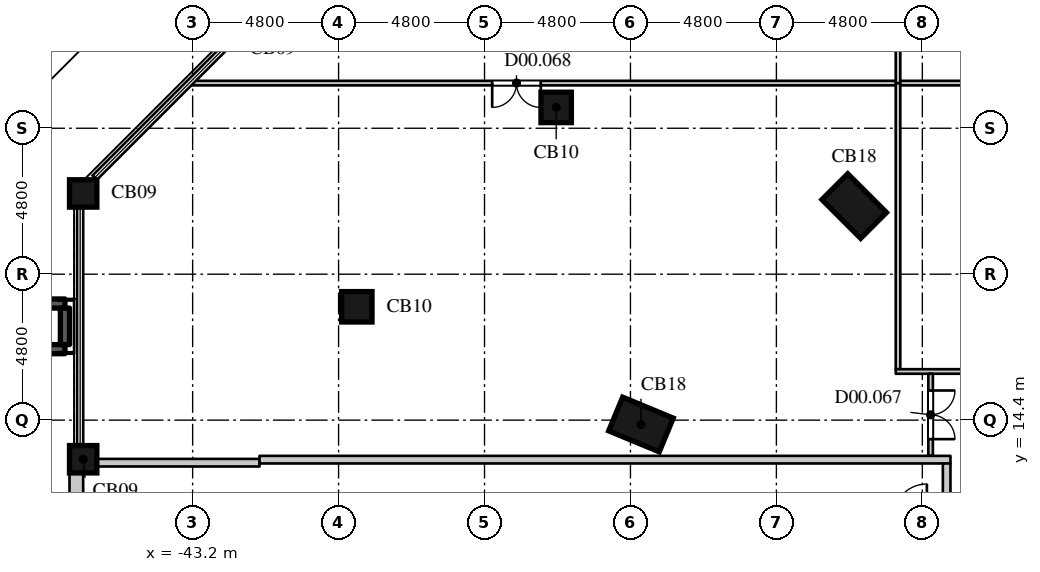
"""IFC4 building model, lengths in metres.
Left out: names, types, materials, properties, quantities, classifications, styles, units other than length and angle.
Written with IfcOpenShell. Run it as: python <this file> out.ifc"""

import sys

from ifc_helpers import new_model, si_unit, direction, frame, frame_2d, origin, origin_2d, place, context, subcontext, project, spatial, rectangle, extrude, element, fill, save


model = new_model("IFC4")
c1 = context("Model", 3, precision=1e-05, world=origin(), true_north=direction((0.0, 1.0)))
c2 = subcontext(c1, "Body", "Model", "MODEL_VIEW")
j1 = project(units=[si_unit("LENGTHUNIT", "METRE"), si_unit("PLANEANGLEUNIT", "RADIAN")], contexts=[c1])
p1 = place(None, origin())
s1 = spatial("IfcSite", under=j1, at=p1, CompositionType="ELEMENT")
p2 = place(p1, origin())
s2 = spatial("IfcBuilding", under=s1, at=p2, CompositionType="ELEMENT")
p3 = place(p2, origin())
s3 = spatial("IfcBuildingStorey", under=s2, at=p3, CompositionType="ELEMENT", Elevation=0.0)
p4 = place(p3, frame((-46.8, 13.114, 0.0), z_axis=(0.0, 0.0, 1.0), x_axis=(1.0, 0.0, 0.0)))
e1 = element("IfcColumn", 1, at=p4, inside=s3, PredefinedType="COLUMN", context=c2, shape_type="SweptSolid", body=[
    extrude(rectangle(XDim=0.9, YDim=0.9, at=origin_2d()), origin(), (0.0, 0.0, 1.0), 6.0),
])
p5 = place(p3, frame((-28.454, 14.257, 0.0), z_axis=(0.0, 0.0, 1.0), x_axis=(-0.382683496864, -0.923879505795, 0.0)))
e2 = element("IfcColumn", 2, at=p5, inside=s3, PredefinedType="COLUMN", context=c2, shape_type="SweptSolid", body=[
    extrude(rectangle(XDim=1.2, YDim=1.8, at=origin_2d()), origin(), (0.0, 0.0, 1.0), 6.0),
])
p6 = place(p3, frame((-37.8, 18.128, 0.0), z_axis=(0.0, 0.0, 1.0), x_axis=(1.0, 0.0, 0.0)))
e3 = element("IfcColumn", 3, at=p6, inside=s3, PredefinedType="COLUMN", context=c2, shape_type="SweptSolid", body=[
    extrude(rectangle(XDim=1.0, YDim=1.0, at=origin_2d()), origin(), (0.0, 0.0, 1.0), 6.0),
])
p7 = place(p3, frame((-21.441, 21.441, 0.0), z_axis=(0.0, 0.0, 1.0), x_axis=(-0.707106781187, -0.707106781187, 0.0)))
e4 = element("IfcColumn", 4, at=p7, inside=s3, PredefinedType="COLUMN", context=c2, shape_type="SweptSolid", body=[
    extrude(rectangle(XDim=1.2, YDim=1.8, at=origin_2d()), origin(), (0.0, 0.0, 1.0), 6.0),
])
p8 = place(p3, frame((-46.8, 21.856, 0.0), z_axis=(0.0, 0.0, 1.0), x_axis=(1.0, 0.0, 0.0)))
e5 = element("IfcColumn", 5, at=p8, inside=s3, PredefinedType="COLUMN", context=c2, shape_type="SweptSolid", body=[
    extrude(rectangle(XDim=0.9, YDim=0.9, at=origin_2d()), origin(), (0.0, 0.0, 1.0), 6.0),
])
p9 = place(p3, frame((-31.243, 24.685, 0.0), z_axis=(0.0, 0.0, 1.0), x_axis=(1.0, 0.0, 0.0)))
e6 = element("IfcColumn", 6, at=p9, inside=s3, PredefinedType="COLUMN", context=c2, shape_type="SweptSolid", body=[
    extrude(rectangle(XDim=1.0, YDim=1.0, at=origin_2d()), origin(), (0.0, 0.0, 1.0), 6.0),
])
p10 = place(p3, frame((-47.025, 12.664, 0.0), z_axis=(0.0, 0.0, 1.0), x_axis=(0.0, -1.0, 0.0)))
e7 = element("IfcWall", 7, at=p10, inside=s3, PredefinedType="ELEMENTEDWALL", context=c2, shape_type="SweptSolid", body=[
    extrude(rectangle(XDim=7.842, YDim=0.45, at=frame_2d((3.921, 0.0))), origin(), (0.0, 0.0, 1.0), 4.8),
])
p11 = place(p10, frame((1.01, 0.0, 0.0)))
e8 = element("IfcOpeningElement", 8, at=p11, cuts=e7, PredefinedType="OPENING", context=c2, shape_type="SweptSolid", body=[
    extrude(rectangle(XDim=1.9, YDim=2.7, at=frame_2d((0.95, 1.35))), frame((0.0, 0.235, 0.0), z_axis=(0.0, -1.0, 0.0), x_axis=(1.0, 0.0, 0.0)), (0.0, 0.0, 1.0), 0.47),
])
p12 = place(p10, frame((4.371, 0.0, 1.05)))
e9 = element("IfcOpeningElement", 9, at=p12, cuts=e7, PredefinedType="OPENING", context=c2, shape_type="SweptSolid", body=[
    extrude(rectangle(XDim=2.29, YDim=2.7, at=frame_2d((1.145, 1.35))), frame((0.0, 0.235, 0.0), z_axis=(0.0, -1.0, 0.0), x_axis=(1.0, 0.0, 0.0)), (0.0, 0.0, 1.0), 0.47),
])
p13 = place(p3, frame((-43.248, 25.485, 0.0), z_axis=(0.0, 0.0, 1.0), x_axis=(1.0, 0.0, 0.0)))
e10 = element("IfcWall", 10, at=p13, inside=s3, PredefinedType="PARTITIONING", context=c2, shape_type="SweptSolid", body=[
    extrude(rectangle(XDim=30.023, YDim=0.15, at=frame_2d((15.012, 0.0))), origin(), (0.0, 0.0, 1.0), 5.65),
])
p14 = place(p13, frame((9.9, 0.0, 0.0)))
e11 = element("IfcOpeningElement", 11, at=p14, cuts=e10, PredefinedType="OPENING", context=c2, shape_type="SweptSolid", body=[
    extrude(rectangle(XDim=1.6, YDim=2.4, at=frame_2d((0.8, 1.2))), frame((0.0, 0.085, 0.0), z_axis=(0.0, -1.0, 0.0), x_axis=(1.0, 0.0, 0.0)), (0.0, 0.0, 1.0), 0.17),
])
p15 = place(p3, frame((-20.0, 16.075, 0.0), z_axis=(0.0, 0.0, 1.0), x_axis=(0.0, 1.0, 0.0)))
e12 = element("IfcWall", 12, at=p15, inside=s3, PredefinedType="PARTITIONING", context=c2, shape_type="SweptSolid", body=[
    extrude(rectangle(XDim=9.41, YDim=0.15, at=frame_2d((4.705, 0.0))), origin(), (0.0, 0.0, 1.0), 5.65),
])
p16 = place(p3, frame((-20.075, 16.0, 0.0), z_axis=(0.0, 0.0, 1.0), x_axis=(1.0, 0.0, 0.0)))
e13 = element("IfcWall", 13, at=p16, inside=s3, PredefinedType="PARTITIONING", context=c2, shape_type="SweptSolid", body=[
    extrude(rectangle(XDim=8.95, YDim=0.15, at=frame_2d((4.475, 0.0))), origin(), (0.0, 0.0, 1.0), 5.65),
])
p17 = place(p16, frame((4.15, 0.0, 0.0)))
e14 = element("IfcOpeningElement", 14, at=p17, cuts=e13, PredefinedType="OPENING", context=c2, shape_type="SweptSolid", body=[
    extrude(rectangle(XDim=1.6, YDim=2.4, at=frame_2d((0.8, 1.2))), frame((0.0, 0.085, 0.0), z_axis=(0.0, -1.0, 0.0), x_axis=(1.0, 0.0, 0.0)), (0.0, 0.0, 1.0), 0.17),
])
p18 = place(p3, frame((-20.0, 25.485, 0.0), z_axis=(0.0, 0.0, 1.0), x_axis=(0.0, 1.0, 0.0)))
e15 = element("IfcWall", 15, at=p18, inside=s3, PredefinedType="PARTITIONING", context=c2, shape_type="SweptSolid", body=[
    extrude(rectangle(XDim=21.37, YDim=0.15, at=frame_2d((10.685, 0.0))), origin(), (0.0, 0.0, 1.0), 5.65),
])
p19 = place(p3, frame((-18.928, 13.225, 0.0), z_axis=(0.0, 0.0, 1.0), x_axis=(0.0, 1.0, 0.0)))
e16 = element("IfcWall", 16, at=p19, inside=s3, PredefinedType="PARTITIONING", context=c2, shape_type="SweptSolid", body=[
    extrude(rectangle(XDim=2.7, YDim=0.15, at=frame_2d((1.35, 0.0))), origin(), (0.0, 0.0, 1.0), 5.65),
])
p20 = place(p19, frame((0.55, 0.0, 0.0)))
e17 = element("IfcOpeningElement", 17, at=p20, cuts=e16, PredefinedType="OPENING", context=c2, shape_type="SweptSolid", body=[
    extrude(rectangle(XDim=1.6, YDim=2.4, at=frame_2d((0.8, 1.2))), frame((0.0, 0.085, 0.0), z_axis=(0.0, -1.0, 0.0), x_axis=(1.0, 0.0, 0.0)), (0.0, 0.0, 1.0), 0.17),
])
p21 = place(p3, frame((-46.35, 13.0, 0.0), z_axis=(0.0, 0.0, 1.0), x_axis=(1.0, 0.0, 0.0)))
e18 = element("IfcWall", 18, at=p21, inside=s3, PredefinedType="PARTITIONING", context=c2, shape_type="SweptSolid", body=[
    extrude(rectangle(XDim=5.35, YDim=0.25, at=frame_2d((2.675, 0.0))), origin(), (0.0, 0.0, 1.0), 5.65),
])
p22 = place(p3, frame((-41.0, 13.1, 0.0), z_axis=(0.0, 0.0, 1.0), x_axis=(1.0, 0.0, 0.0)))
e19 = element("IfcWall", 19, at=p22, inside=s3, PredefinedType="PARTITIONING", context=c2, shape_type="SweptSolid", body=[
    extrude(rectangle(XDim=22.725, YDim=0.25, at=frame_2d((11.363, 0.0))), origin(), (0.0, 0.0, 1.0), 5.65),
])
p23 = place(p3, frame((-18.4, 11.2, 0.0), z_axis=(0.0, 0.0, 1.0), x_axis=(0.0, 1.0, 0.0)))
e20 = element("IfcWall", 20, at=p23, inside=s3, PredefinedType="PARTITIONING", context=c2, shape_type="SweptSolid", body=[
    extrude(rectangle(XDim=1.775, YDim=0.25, at=frame_2d((0.888, 0.0))), origin(), (0.0, 0.0, 1.0), 5.65),
])
for number, where, z_axis, x_axis in (
    (21, (-47.4, 18.235, 0.0), (0.0, 0.0, 1.0), (-1.0, 0.0, 0.0)),
    (22, (-47.4, 16.735, 0.0), (0.0, 0.0, 1.0), (-1.0, 0.0, 0.0)),
):
    element("IfcWall", number, at=place(p3, frame(where, z_axis=z_axis, x_axis=x_axis)), inside=s3, PredefinedType="SOLIDWALL", context=c2, shape_type="SweptSolid", body=[
        extrude(rectangle(XDim=1.35, YDim=0.3, at=frame_2d((0.675, 0.0))), origin(), (0.0, 0.0, 1.0), 5.8),
    ])
p24 = place(p3, frame((-47.4, 18.085, 0.0), z_axis=(0.0, 0.0, 1.0), x_axis=(0.0, -1.0, 0.0)))
e23 = element("IfcWall", 23, at=p24, inside=s3, PredefinedType="SOLIDWALL", context=c2, shape_type="SweptSolid", body=[
    extrude(rectangle(XDim=1.2, YDim=0.3, at=frame_2d((0.6, 0.0))), origin(), (0.0, 0.0, 1.0), 5.8),
])
p25 = place(p20, origin())
e24 = element("IfcDoor", 24, at=p25, inside=s3, OperationType="DOUBLE_DOOR_SINGLE_SWING", PredefinedType="DOOR", context=c2, shape_type="SweptSolid", body=[
    extrude(rectangle(XDim=1.6, YDim=2.4, at=frame_2d((0.8, 1.2))), frame((0.0, 0.025, 0.0), z_axis=(0.0, -1.0, 0.0), x_axis=(1.0, 0.0, 0.0)), (0.0, 0.0, 1.0), 0.05),
])
fill(e17, e24)
p26 = place(p14, origin())
e25 = element("IfcDoor", 25, at=p26, inside=s3, OperationType="DOUBLE_DOOR_SINGLE_SWING", PredefinedType="DOOR", context=c2, shape_type="SweptSolid", body=[
    extrude(rectangle(XDim=1.6, YDim=2.4, at=frame_2d((0.8, 1.2))), frame((0.0, 0.025, 0.0), z_axis=(0.0, -1.0, 0.0), x_axis=(1.0, 0.0, 0.0)), (0.0, 0.0, 1.0), 0.05),
])
fill(e11, e25)
save(model, sys.argv[1])
